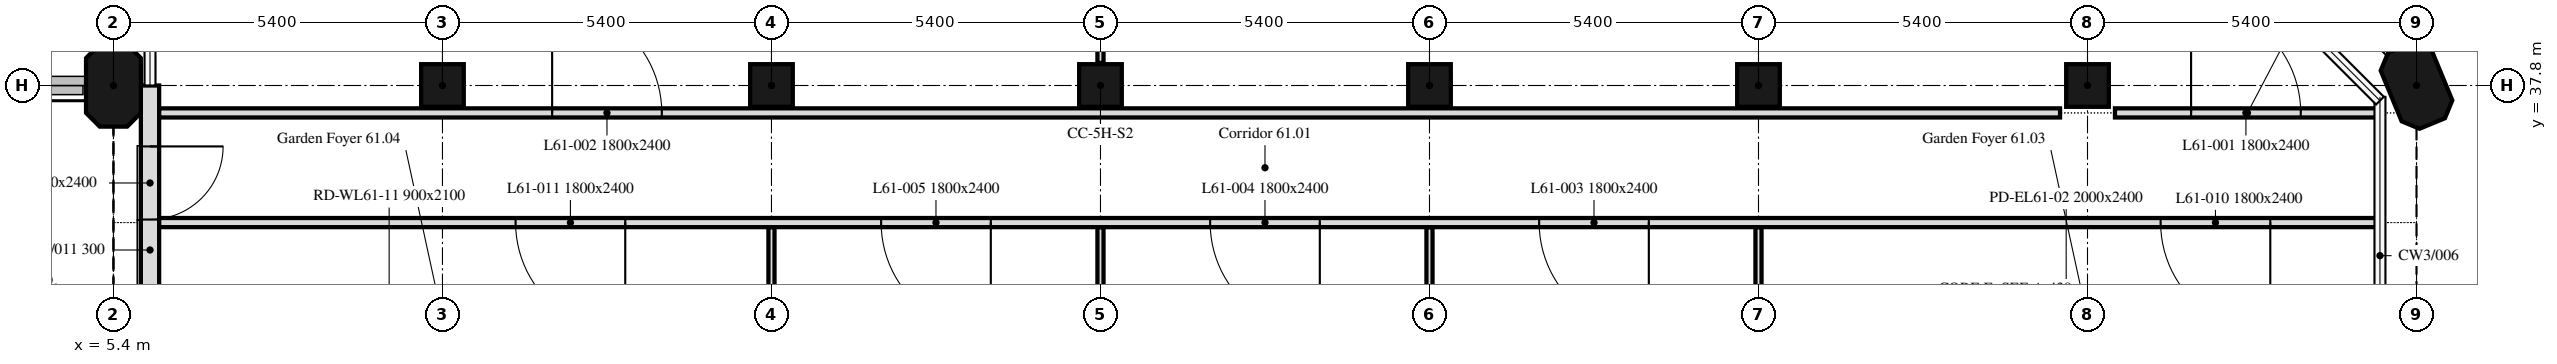
"""IFC4 building model, lengths in metres.
Left out: names, types, materials, properties, quantities, classifications, styles, units other than length and angle.
Written with IfcOpenShell. Run it as: python <this file> out.ifc"""

import sys

from ifc_helpers import new_model, si_unit, direction, frame, frame_2d, origin, origin_2d, place, context, subcontext, project, spatial, polyline, rectangle, outline, extrude, element, fill, save


model = new_model("IFC4")
c1 = context("Model", 3, precision=1e-05, world=origin(), true_north=direction((0.0, 1.0)))
c2 = subcontext(c1, "Body", "Model", "MODEL_VIEW")
j1 = project(units=[si_unit("LENGTHUNIT", "METRE"), si_unit("PLANEANGLEUNIT", "RADIAN")], contexts=[c1])
p1 = place(None, origin())
s1 = spatial("IfcSite", under=j1, at=p1, CompositionType="ELEMENT")
p2 = place(p1, origin())
s2 = spatial("IfcBuilding", under=s1, at=p2, CompositionType="ELEMENT")
p3 = place(p2, frame((0.0, 0.0, 250.9)))
s3 = spatial("IfcBuildingStorey", under=s2, at=p3, CompositionType="ELEMENT", Elevation=250.9)
p4 = place(p3, frame((5.4, 37.8, 0.0), z_axis=(0.0, 0.0, 1.0), x_axis=(0.0, 1.0, 0.0)))
e1 = element("IfcColumn", 1, at=p4, inside=s3, PredefinedType="COLUMN", context=c2, shape_type="SweptSolid", body=[
    extrude(outline(polyline([(-0.45, -0.45), (0.45, -0.45), (0.675, -0.225), (0.675, 0.225), (0.45, 0.45), (-0.45, 0.45), (-0.675, 0.225), (-0.675, -0.225), (-0.45, -0.45)])), origin(), (0.0, 0.0, 1.0), 4.5),
])
for number, where, z_axis, x_axis in (
    (2, (10.8, 37.8, 0.0), (0.0, 0.0, 1.0), (1.0, 0.0, 0.0)),
    (3, (16.2, 37.8, 0.0), (0.0, 0.0, 1.0), (1.0, 0.0, 0.0)),
    (4, (21.6, 37.8, 0.0), (0.0, 0.0, 1.0), (1.0, 0.0, 0.0)),
    (5, (27.0, 37.8, 0.0), (0.0, 0.0, 1.0), (1.0, 0.0, 0.0)),
    (6, (32.4, 37.8, 0.0), (0.0, 0.0, 1.0), (1.0, 0.0, 0.0)),
    (7, (37.8, 37.8, 0.0), (0.0, 0.0, 1.0), (1.0, 0.0, 0.0)),
):
    element("IfcColumn", number, at=place(p3, frame(where, z_axis=z_axis, x_axis=x_axis)), inside=s3, PredefinedType="COLUMN", context=c2, shape_type="SweptSolid", body=[
        extrude(rectangle(XDim=0.7, YDim=0.7, at=origin_2d()), origin(), (0.0, 0.0, 1.0), 4.5),
    ])
p5 = place(p3, frame((43.2, 37.8, 0.0), z_axis=(0.0, 0.0, 1.0), x_axis=(-0.382683432365, 0.923879532511, 0.0)))
e8 = element("IfcColumn", 8, at=p5, inside=s3, PredefinedType="COLUMN", context=c2, shape_type="SweptSolid", body=[
    extrude(outline(polyline([(-0.45, -0.45), (0.45, -0.45), (0.675, -0.225), (0.675, 0.225), (0.45, 0.45), (-0.45, 0.45), (-0.675, 0.225), (-0.675, -0.225), (-0.45, -0.45)])), origin(), (0.0, 0.0, 1.0), 4.5),
])
p6 = place(p3, frame((6.0, 37.8, 0.0), z_axis=(0.0, 0.0, 1.0), x_axis=(0.0, -1.0, 0.0)))
e9 = element("IfcWall", 9, at=p6, inside=s3, PredefinedType="SOLIDWALL", context=c2, shape_type="SweptSolid", body=[
    extrude(rectangle(XDim=5.4, YDim=0.3, at=frame_2d((2.7, 0.0))), origin(), (0.0, 0.0, 1.0), 4.5),
])
p7 = place(p6, frame((1.0, 0.0, 0.0)))
e10 = element("IfcOpeningElement", 10, at=p7, cuts=e9, PredefinedType="OPENING", context=c2, shape_type="SweptSolid", body=[
    extrude(rectangle(XDim=1.2, YDim=2.4, at=frame_2d((0.6, 1.2))), frame((0.0, 0.16, 0.0), z_axis=(0.0, -1.0, 0.0), x_axis=(1.0, 0.0, 0.0)), (0.0, 0.0, 1.0), 0.32),
])
p8 = place(p3, frame((21.6, 42.6, 0.0), z_axis=(0.0, 0.0, 1.0), x_axis=(0.0, -1.0, 0.0)))
e11 = element("IfcWall", 11, at=p8, inside=s3, PredefinedType="PARTITIONING", context=c2, shape_type="SweptSolid", body=[
    extrude(rectangle(XDim=4.43, YDim=0.1, at=frame_2d((2.215, 0.0))), origin(), (0.0, 0.0, 1.0), 3.75),
])
p9 = place(p3, frame((38.251, 37.35, 0.0), z_axis=(0.0, 0.0, 1.0), x_axis=(1.0, 0.0, 0.0)))
e12 = element("IfcWall", 12, at=p9, inside=s3, PredefinedType="PARTITIONING", context=c2, shape_type="SweptSolid", body=[
    extrude(rectangle(XDim=4.349, YDim=0.15, at=frame_2d((2.175, 0.0))), origin(), (0.0, 0.0, 1.0), 4.5),
])
p10 = place(p9, frame((1.249, 0.0, 0.0)))
e13 = element("IfcOpeningElement", 13, at=p10, cuts=e12, PredefinedType="OPENING", context=c2, shape_type="SweptSolid", body=[
    extrude(rectangle(XDim=1.8, YDim=2.4, at=frame_2d((0.9, 1.2))), frame((0.0, 0.075, 0.0), z_axis=(0.0, -1.0, 0.0), x_axis=(1.0, 0.0, 0.0)), (0.0, 0.0, 1.0), 0.15),
])
p11 = place(p3, frame((6.151, 37.35, 0.0), z_axis=(0.0, 0.0, 1.0), x_axis=(1.0, 0.0, 0.0)))
e14 = element("IfcWall", 14, at=p11, inside=s3, PredefinedType="PARTITIONING", context=c2, shape_type="SweptSolid", body=[
    extrude(rectangle(XDim=31.198, YDim=0.15, at=frame_2d((15.599, 0.0))), origin(), (0.0, 0.0, 1.0), 3.75),
])
p12 = place(p11, frame((6.449, 0.0, 0.0)))
e15 = element("IfcOpeningElement", 15, at=p12, cuts=e14, PredefinedType="OPENING", context=c2, shape_type="SweptSolid", body=[
    extrude(rectangle(XDim=1.8, YDim=2.4, at=frame_2d((0.9, 1.2))), frame((0.0, 0.075, 0.0), z_axis=(0.0, -1.0, 0.0), x_axis=(1.0, 0.0, 0.0)), (0.0, 0.0, 1.0), 0.15),
])
p13 = place(p3, frame((32.4, 32.4, 0.0), z_axis=(0.0, 0.0, 1.0), x_axis=(0.0, 1.0, 0.0)))
e16 = element("IfcWall", 16, at=p13, inside=s3, PredefinedType="PARTITIONING", context=c2, shape_type="SweptSolid", body=[
    extrude(rectangle(XDim=3.075, YDim=0.1, at=frame_2d((1.538, 0.0))), origin(), (0.0, 0.0, 1.0), 4.5),
])
for number, where, z_axis, x_axis in (
    (17, (27.0, 35.475, 0.0), (0.0, 0.0, 1.0), (0.0, -1.0, 0.0)),
    (18, (21.6, 35.475, 0.0), (0.0, 0.0, 1.0), (0.0, -1.0, 0.0)),
):
    element("IfcWall", number, at=place(p3, frame(where, z_axis=z_axis, x_axis=x_axis)), inside=s3, PredefinedType="PARTITIONING", context=c2, shape_type="SweptSolid", body=[
        extrude(rectangle(XDim=2.655, YDim=0.1, at=frame_2d((1.328, 0.0))), origin(), (0.0, 0.0, 1.0), 3.75),
    ])
p14 = place(p3, frame((16.2, 35.475, 0.0), z_axis=(0.0, 0.0, 1.0), x_axis=(0.0, -1.0, 0.0)))
e19 = element("IfcWall", 19, at=p14, inside=s3, PredefinedType="PARTITIONING", context=c2, shape_type="SweptSolid", body=[
    extrude(rectangle(XDim=3.075, YDim=0.1, at=frame_2d((1.538, 0.0))), origin(), (0.0, 0.0, 1.0), 3.75),
])
p15 = place(p3, frame((42.6, 35.55, 0.0), z_axis=(0.0, 0.0, 1.0), x_axis=(-1.0, 0.0, 0.0)))
e20 = element("IfcWall", 20, at=p15, inside=s3, PredefinedType="PARTITIONING", context=c2, shape_type="SweptSolid", body=[
    extrude(rectangle(XDim=36.449, YDim=0.15, at=frame_2d((18.225, 0.0))), origin(), (0.0, 0.0, 1.0), 3.75),
])
p16 = place(p15, frame((12.0, 0.0, 0.0)))
e21 = element("IfcOpeningElement", 21, at=p16, cuts=e20, PredefinedType="OPENING", context=c2, shape_type="SweptSolid", body=[
    extrude(rectangle(XDim=1.8, YDim=2.4, at=frame_2d((0.9, 1.2))), frame((0.0, 0.075, 0.0), z_axis=(0.0, -1.0, 0.0), x_axis=(1.0, 0.0, 0.0)), (0.0, 0.0, 1.0), 0.15),
])
p17 = place(p15, frame((17.4, 0.0, 0.0)))
e22 = element("IfcOpeningElement", 22, at=p17, cuts=e20, PredefinedType="OPENING", context=c2, shape_type="SweptSolid", body=[
    extrude(rectangle(XDim=1.8, YDim=2.4, at=frame_2d((0.9, 1.2))), frame((0.0, 0.075, 0.0), z_axis=(0.0, -1.0, 0.0), x_axis=(1.0, 0.0, 0.0)), (0.0, 0.0, 1.0), 0.15),
])
p18 = place(p15, frame((22.8, 0.0, 0.0)))
e23 = element("IfcOpeningElement", 23, at=p18, cuts=e20, PredefinedType="OPENING", context=c2, shape_type="SweptSolid", body=[
    extrude(rectangle(XDim=1.8, YDim=2.4, at=frame_2d((0.9, 1.2))), frame((0.0, 0.075, 0.0), z_axis=(0.0, -1.0, 0.0), x_axis=(1.0, 0.0, 0.0)), (0.0, 0.0, 1.0), 0.15),
])
p19 = place(p15, frame((1.8, 0.0, 0.0)))
e24 = element("IfcOpeningElement", 24, at=p19, cuts=e20, PredefinedType="OPENING", context=c2, shape_type="SweptSolid", body=[
    extrude(rectangle(XDim=1.8, YDim=2.4, at=frame_2d((0.9, 1.2))), frame((0.0, 0.075, 0.0), z_axis=(0.0, -1.0, 0.0), x_axis=(1.0, 0.0, 0.0)), (0.0, 0.0, 1.0), 0.15),
])
p20 = place(p15, frame((28.8, 0.0, 0.0)))
e25 = element("IfcOpeningElement", 25, at=p20, cuts=e20, PredefinedType="OPENING", context=c2, shape_type="SweptSolid", body=[
    extrude(rectangle(XDim=1.8, YDim=2.4, at=frame_2d((0.9, 1.2))), frame((0.0, 0.075, 0.0), z_axis=(0.0, -1.0, 0.0), x_axis=(1.0, 0.0, 0.0)), (0.0, 0.0, 1.0), 0.15),
])
p21 = place(p7, origin())
e26 = element("IfcDoor", 26, at=p21, inside=s3, OperationType="SINGLE_SWING_LEFT", PredefinedType="DOOR", context=c2, shape_type="SweptSolid", body=[
    extrude(rectangle(XDim=1.2, YDim=2.4, at=frame_2d((0.6, 1.2))), frame((0.0, 0.025, 0.0), z_axis=(0.0, -1.0, 0.0), x_axis=(1.0, 0.0, 0.0)), (0.0, 0.0, 1.0), 0.05),
])
fill(e10, e26)
p22 = place(p10, origin())
e27 = element("IfcDoor", 27, at=p22, inside=s3, OperationType="DOUBLE_DOOR_SINGLE_SWING", PredefinedType="DOOR", context=c2, shape_type="SweptSolid", body=[
    extrude(rectangle(XDim=1.8, YDim=2.4, at=frame_2d((0.9, 1.2))), frame((0.0, 0.025, 0.0), z_axis=(0.0, -1.0, 0.0), x_axis=(1.0, 0.0, 0.0)), (0.0, 0.0, 1.0), 0.05),
])
fill(e13, e27)
p23 = place(p12, origin())
e28 = element("IfcDoor", 28, at=p23, inside=s3, OperationType="DOUBLE_DOOR_SINGLE_SWING", PredefinedType="DOOR", context=c2, shape_type="SweptSolid", body=[
    extrude(rectangle(XDim=1.8, YDim=2.4, at=frame_2d((0.9, 1.2))), frame((0.0, 0.025, 0.0), z_axis=(0.0, -1.0, 0.0), x_axis=(1.0, 0.0, 0.0)), (0.0, 0.0, 1.0), 0.05),
])
fill(e15, e28)
p24 = place(p16, origin())
e29 = element("IfcDoor", 29, at=p24, inside=s3, OperationType="DOUBLE_DOOR_SINGLE_SWING", PredefinedType="DOOR", context=c2, shape_type="SweptSolid", body=[
    extrude(rectangle(XDim=1.8, YDim=2.4, at=frame_2d((0.9, 1.2))), frame((0.0, 0.025, 0.0), z_axis=(0.0, -1.0, 0.0), x_axis=(1.0, 0.0, 0.0)), (0.0, 0.0, 1.0), 0.05),
])
fill(e21, e29)
p25 = place(p17, origin())
e30 = element("IfcDoor", 30, at=p25, inside=s3, OperationType="DOUBLE_DOOR_SINGLE_SWING", PredefinedType="DOOR", context=c2, shape_type="SweptSolid", body=[
    extrude(rectangle(XDim=1.8, YDim=2.4, at=frame_2d((0.9, 1.2))), frame((0.0, 0.025, 0.0), z_axis=(0.0, -1.0, 0.0), x_axis=(1.0, 0.0, 0.0)), (0.0, 0.0, 1.0), 0.05),
])
fill(e22, e30)
p26 = place(p18, origin())
e31 = element("IfcDoor", 31, at=p26, inside=s3, OperationType="DOUBLE_DOOR_SINGLE_SWING", PredefinedType="DOOR", context=c2, shape_type="SweptSolid", body=[
    extrude(rectangle(XDim=1.8, YDim=2.4, at=frame_2d((0.9, 1.2))), frame((0.0, 0.025, 0.0), z_axis=(0.0, -1.0, 0.0), x_axis=(1.0, 0.0, 0.0)), (0.0, 0.0, 1.0), 0.05),
])
fill(e23, e31)
p27 = place(p19, origin())
e32 = element("IfcDoor", 32, at=p27, inside=s3, OperationType="DOUBLE_DOOR_SINGLE_SWING", PredefinedType="DOOR", context=c2, shape_type="SweptSolid", body=[
    extrude(rectangle(XDim=1.8, YDim=2.4, at=frame_2d((0.9, 1.2))), frame((0.0, 0.025, 0.0), z_axis=(0.0, -1.0, 0.0), x_axis=(1.0, 0.0, 0.0)), (0.0, 0.0, 1.0), 0.05),
])
fill(e24, e32)
p28 = place(p20, origin())
e33 = element("IfcDoor", 33, at=p28, inside=s3, OperationType="DOUBLE_DOOR_SINGLE_SWING", PredefinedType="DOOR", context=c2, shape_type="SweptSolid", body=[
    extrude(rectangle(XDim=1.8, YDim=2.4, at=frame_2d((0.9, 1.2))), frame((0.0, 0.025, 0.0), z_axis=(0.0, -1.0, 0.0), x_axis=(1.0, 0.0, 0.0)), (0.0, 0.0, 1.0), 0.05),
])
fill(e25, e33)
save(model, sys.argv[1])
